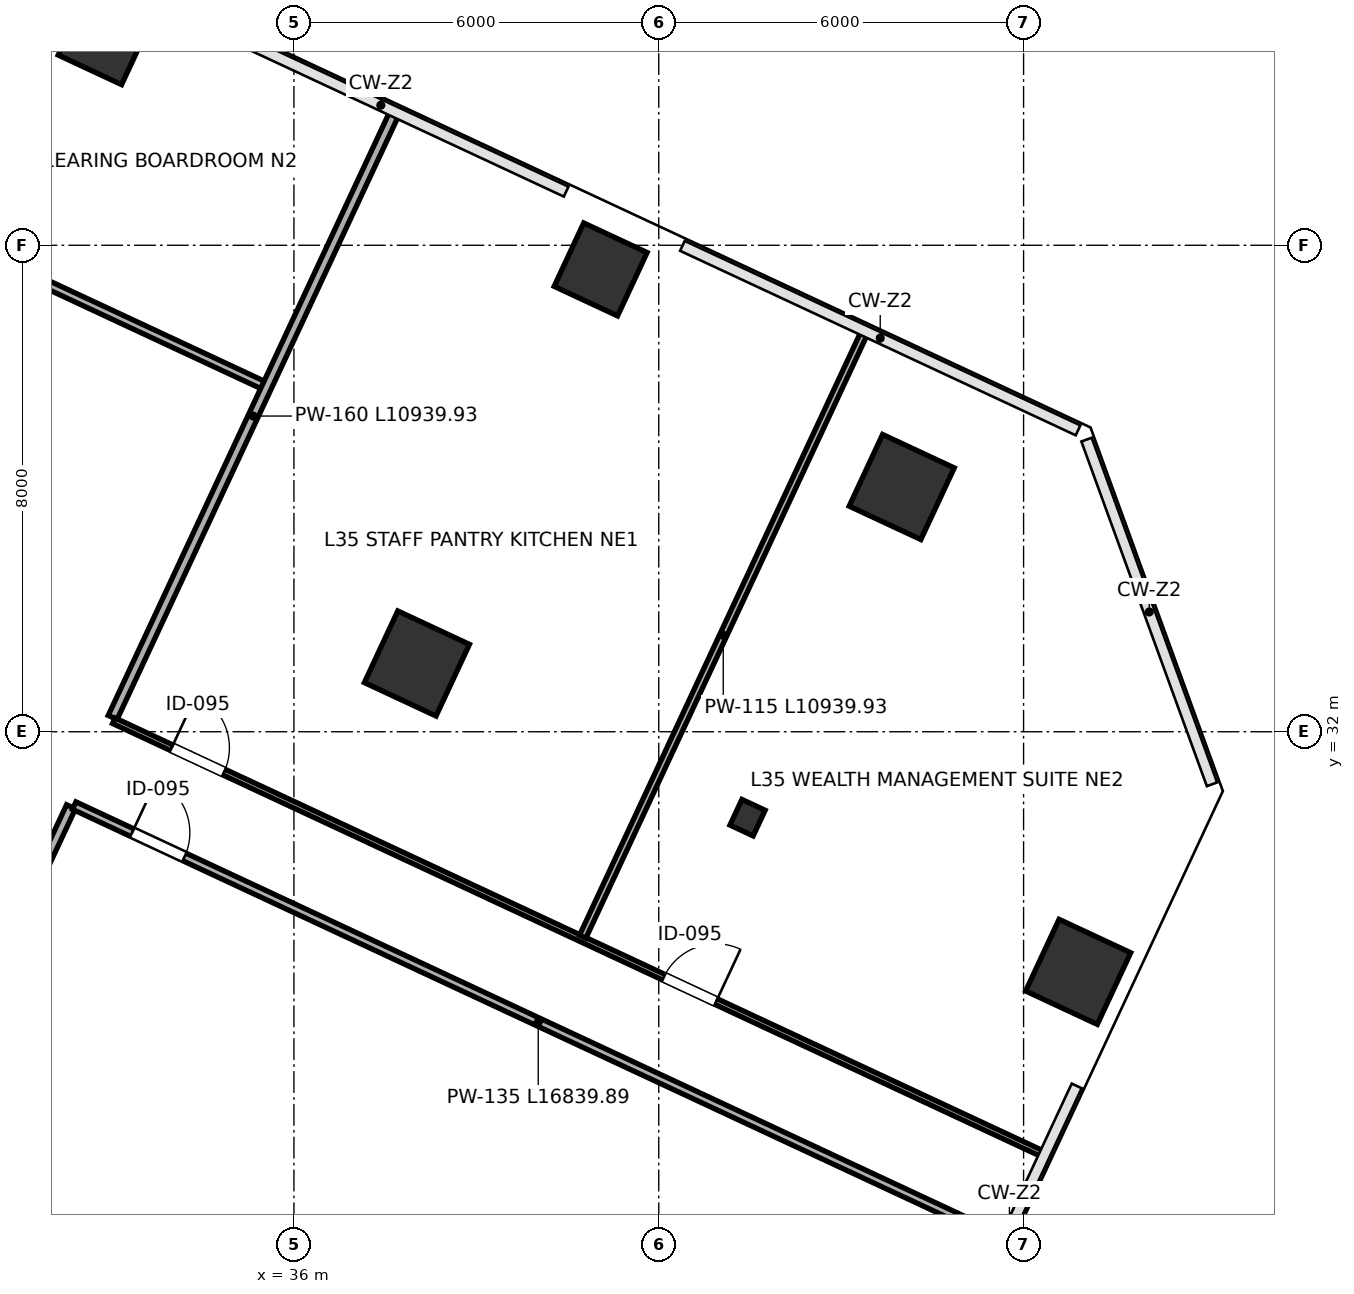
"""IFC4 building model, lengths in metres.
Left out: names, types, materials, properties, quantities, classifications, styles, units other than length and angle.
Written with IfcOpenShell. Run it as: python <this file> out.ifc"""

import sys

from ifc_helpers import new_model, si_unit, direction, frame, frame_2d, origin, origin_2d, place, context, subcontext, project, spatial, rectangle, i_section, extrude, clip, halfspace, source, transform, mapped, element, fill, save


model = new_model("IFC4")
c1 = context("Model", 3, precision=1e-05, world=origin(), true_north=direction((0.0, 1.0)))
c2 = subcontext(c1, "Body", "Model", "MODEL_VIEW")
j1 = project(units=[si_unit("LENGTHUNIT", "METRE"), si_unit("PLANEANGLEUNIT", "RADIAN")], contexts=[c1])
p1 = place(None, origin())
s1 = spatial("IfcSite", under=j1, at=p1, CompositionType="ELEMENT")
p2 = place(p1, origin())
s2 = spatial("IfcBuilding", under=s1, at=p2, CompositionType="ELEMENT")
p3 = place(p2, frame((0.0, 0.0, 158.2)))
s3 = spatial("IfcBuildingStorey", under=s2, at=p3, CompositionType="ELEMENT", Elevation=158.2)
p4 = place(p3, frame((32.887, 43.406, 0.0), z_axis=(0.058390097593, -0.059606557959, 0.996512746909), x_axis=(-0.942137163115, -0.333367736718, 0.035263550505)))
e1 = element("IfcColumn", 1, at=p4, inside=s3, PredefinedType="COLUMN", context=c2, shape_type="Clipping", body=[
    clip(clip(extrude(rectangle(XDim=1.15, YDim=1.15, at=origin_2d()), origin(), (0.0, 0.0, 1.0), 4.215), halfspace(frame((0.0, 0.0, 0.065), z_axis=(0.0, 0.0, -1.0), x_axis=(1.0, 0.0, 0.0)), False)), halfspace(frame((0.0, 0.0, 4.15), z_axis=(0.0, 0.0, 1.0), x_axis=(1.0, 0.0, 0.0)), False)),
])
p5 = place(p3, frame((38.022, 33.123, 0.0), z_axis=(0.004864889576, -0.085598890399, 0.996317802115), x_axis=(-0.928739514699, 0.368958004081, 0.036234031812)))
e2 = element("IfcColumn", 2, at=p5, inside=s3, PredefinedType="COLUMN", context=c2, shape_type="Clipping", body=[
    clip(clip(extrude(rectangle(XDim=1.3, YDim=1.3, at=origin_2d()), origin(), (0.0, 0.0, 1.0), 4.216), halfspace(frame((0.0, 0.0, 0.075), z_axis=(0.0, 0.0, -1.0), x_axis=(1.0, 0.0, 0.0)), False)), halfspace(frame((0.0, 0.0, 4.141), z_axis=(0.0, 0.0, 1.0), x_axis=(1.0, 0.0, 0.0)), False)),
])
p6 = place(p3, frame((41.044, 39.603, 0.0), z_axis=(0.038139756449, -0.101359292139, 0.994118530596), x_axis=(-0.996204703506, 0.074036702097, 0.045768498506)))
e3 = element("IfcColumn", 3, at=p6, inside=s3, PredefinedType="COLUMN", context=c2, shape_type="Clipping", body=[
    clip(clip(extrude(rectangle(XDim=1.15, YDim=1.15, at=origin_2d()), origin(), (0.0, 0.0, 1.0), 4.225), halfspace(frame((0.0, 0.0, 0.084), z_axis=(0.0, 0.0, -1.0), x_axis=(1.0, 0.0, 0.0)), False)), halfspace(frame((0.0, 0.0, 4.141), z_axis=(0.0, 0.0, 1.0), x_axis=(1.0, 0.0, 0.0)), False)),
])
p7 = place(p3, frame((43.46, 30.587, 0.0), z_axis=(-0.008489733, -0.113254193287, 0.993529774157), x_axis=(-0.87238491172, 0.486457395979, 0.04799758016)))
e4 = element("IfcColumn", 4, at=p7, inside=s3, PredefinedType="COLUMN", context=c2, shape_type="Clipping", body=[
    clip(clip(extrude(i_section(OverallWidth=0.421, OverallDepth=0.465, WebThickness=0.045, FlangeThickness=0.072, FilletRadius=0.015, at=origin_2d()), origin(), (0.0, 0.0, 1.0), 4.227), halfspace(frame((0.0, 0.0, 0.035), z_axis=(0.0, 0.0, -1.0), x_axis=(1.0, 0.0, 0.0)), False)), halfspace(frame((0.0, 0.0, 4.192), z_axis=(0.0, 0.0, 1.0), x_axis=(1.0, 0.0, 0.0)), False)),
])
p8 = place(p3, frame((45.996, 36.025, 0.0), z_axis=(0.019313420734, -0.126430840804, 0.991787393685), x_axis=(-0.959209091599, 0.277482108063, 0.054051811235)))
e5 = element("IfcColumn", 5, at=p8, inside=s3, PredefinedType="COLUMN", context=c2, shape_type="Clipping", body=[
    clip(clip(extrude(rectangle(XDim=1.3, YDim=1.3, at=origin_2d()), origin(), (0.0, 0.0, 1.0), 4.235), halfspace(frame((0.0, 0.0, 0.112), z_axis=(0.0, 0.0, -1.0), x_axis=(1.0, 0.0, 0.0)), False)), halfspace(frame((0.0, 0.0, 4.123), z_axis=(0.0, 0.0, 1.0), x_axis=(1.0, 0.0, 0.0)), False)),
])
p9 = place(p3, frame((48.898, 28.051, 0.0), z_axis=(-0.021864344018, -0.140622254685, 0.989821868797), x_axis=(-0.831278676398, 0.552592535403, 0.060143594692)))
e6 = element("IfcColumn", 6, at=p9, inside=s3, PredefinedType="COLUMN", context=c2, shape_type="Clipping", body=[
    clip(clip(extrude(rectangle(XDim=1.3, YDim=1.3, at=origin_2d()), origin(), (0.0, 0.0, 1.0), 4.243), halfspace(frame((0.0, 0.0, 0.125), z_axis=(0.0, 0.0, -1.0), x_axis=(1.0, 0.0, 0.0)), False)), halfspace(frame((0.0, 0.0, 4.118), z_axis=(0.0, 0.0, 1.0), x_axis=(1.0, 0.0, 0.0)), False)),
])
p10 = place(p3, frame((11.673, 48.808, 0.0), z_axis=(0.0, 0.0, 1.0), x_axis=(0.906307085664, -0.422619765836, 0.0)))
e7 = element("IfcWall", 7, at=p10, inside=s3, PredefinedType="PARTITIONING", context=c2, shape_type="SweptSolid", body=[
    extrude(rectangle(XDim=26.31, YDim=0.135, at=frame_2d((13.155, 0.0))), origin(), (0.0, 0.0, 1.0), 3.96),
])
p11 = place(p10, frame((2.1, 0.0, 0.0)))
e8 = element("IfcOpeningElement", 8, at=p11, cuts=e7, PredefinedType="OPENING", context=c2, shape_type="SweptSolid", body=[
    extrude(rectangle(XDim=0.95, YDim=2.15, at=frame_2d((0.475, 1.075))), frame((0.0, 0.078, 0.0), z_axis=(0.0, -1.0, 0.0), x_axis=(1.0, 0.0, 0.0)), (0.0, 0.0, 1.0), 0.155),
])
p12 = place(p10, frame((18.2, 0.0, 0.0)))
e9 = element("IfcOpeningElement", 9, at=p12, cuts=e7, PredefinedType="OPENING", context=c2, shape_type="SweptSolid", body=[
    extrude(rectangle(XDim=0.95, YDim=2.15, at=frame_2d((0.475, 1.075))), frame((0.0, 0.078, 0.0), z_axis=(0.0, -1.0, 0.0), x_axis=(1.0, 0.0, 0.0)), (0.0, 0.0, 1.0), 0.155),
])
p13 = place(p3, frame((33.018, 32.234, 0.0), z_axis=(0.0, 0.0, 1.0), x_axis=(0.422624006235, 0.906305108313, 0.0)))
e10 = element("IfcWall", 10, at=p13, inside=s3, PredefinedType="PARTITIONING", context=c2, shape_type="SweptSolid", body=[
    extrude(rectangle(XDim=10.94, YDim=0.16, at=frame_2d((5.47, 0.0))), origin(), (0.0, 0.0, 1.0), 3.195),
])
p14 = place(p3, frame((23.256, 11.299, 0.0), z_axis=(0.0, 0.0, 1.0), x_axis=(0.422623489462, 0.906305349292, 0.0)))
e11 = element("IfcWall", 11, at=p14, inside=s3, PredefinedType="PARTITIONING", context=c2, shape_type="SweptSolid", body=[
    extrude(rectangle(XDim=21.48, YDim=0.16, at=frame_2d((10.74, 0.0))), origin(), (0.0, 0.0, 1.0), 3.96),
])
p15 = place(p3, frame((33.038, 32.181, 0.0), z_axis=(0.0, 0.0, 1.0), x_axis=(0.906309400931, -0.422614800716, 0.0)))
e12 = element("IfcWall", 12, at=p15, inside=s3, PredefinedType="PARTITIONING", context=c2, shape_type="SweptSolid", body=[
    extrude(rectangle(XDim=16.84, YDim=0.1, at=frame_2d((8.42, 0.0))), origin(), (0.0, 0.0, 1.0), 3.96),
])
p16 = place(p15, frame((1.05, 0.0, 0.0)))
e13 = element("IfcOpeningElement", 13, at=p16, cuts=e12, PredefinedType="OPENING", context=c2, shape_type="SweptSolid", body=[
    extrude(rectangle(XDim=0.95, YDim=2.15, at=frame_2d((0.475, 1.075))), frame((0.0, 0.06, 0.0), z_axis=(0.0, -1.0, 0.0), x_axis=(1.0, 0.0, 0.0)), (0.0, 0.0, 1.0), 0.12),
])
p17 = place(p15, frame((9.98, 0.0, 0.0)))
e14 = element("IfcOpeningElement", 14, at=p17, cuts=e12, PredefinedType="OPENING", context=c2, shape_type="SweptSolid", body=[
    extrude(rectangle(XDim=0.95, YDim=2.15, at=frame_2d((0.475, 1.075))), frame((0.0, 0.06, 0.0), z_axis=(0.0, -1.0, 0.0), x_axis=(1.0, 0.0, 0.0)), (0.0, 0.0, 1.0), 0.12),
])
p18 = place(p3, frame((32.387, 30.785, 0.0), z_axis=(0.0, 0.0, 1.0), x_axis=(0.906303847891, -0.422626709163, 0.0)))
e15 = element("IfcWall", 15, at=p18, inside=s3, PredefinedType="PARTITIONING", context=c2, shape_type="SweptSolid", body=[
    extrude(rectangle(XDim=16.84, YDim=0.135, at=frame_2d((8.42, 0.0))), origin(), (0.0, 0.0, 1.0), 3.96),
])
p19 = place(p18, frame((1.05, 0.0, 0.0)))
e16 = element("IfcOpeningElement", 16, at=p19, cuts=e15, PredefinedType="OPENING", context=c2, shape_type="SweptSolid", body=[
    extrude(rectangle(XDim=0.95, YDim=2.15, at=frame_2d((0.475, 1.075))), frame((0.0, 0.078, 0.0), z_axis=(0.0, -1.0, 0.0), x_axis=(1.0, 0.0, 0.0)), (0.0, 0.0, 1.0), 0.155),
])
p20 = place(p3, frame((40.749, 28.629, 0.0), z_axis=(0.0, 0.0, 1.0), x_axis=(0.422632554077, 0.906301122274, 0.0)))
e17 = element("IfcWall", 17, at=p20, inside=s3, PredefinedType="PARTITIONING", context=c2, shape_type="SweptSolid", body=[
    extrude(rectangle(XDim=10.94, YDim=0.115, at=frame_2d((5.47, 0.0))), origin(), (0.0, 0.0, 1.0), 3.96),
])
m1 = source(origin(), c2, "Body", "SweptSolid", [
    extrude(rectangle(XDim=0.95, YDim=2.15, at=frame_2d((0.475, 1.075))), frame((0.0, 0.025, 0.0), z_axis=(0.0, -1.0, 0.0), x_axis=(1.0, 0.0, 0.0)), (0.0, 0.0, 1.0), 0.05),
])
p21 = place(p16, origin())
e18 = element("IfcDoor", 18, at=p21, inside=s3, OperationType="SINGLE_SWING_LEFT", PredefinedType="DOOR", context=c2, shape_type="MappedRepresentation", body=[
    mapped(m1, transform((0.0, 0.0, 0.0), scale=1.0)),
])
fill(e13, e18)
p22 = place(p17, origin())
e19 = element("IfcDoor", 19, at=p22, inside=s3, OperationType="SINGLE_SWING_RIGHT", PredefinedType="DOOR", context=c2, shape_type="MappedRepresentation", body=[
    mapped(m1, transform((0.0, 0.0, 0.0), scale=1.0)),
])
fill(e14, e19)
p23 = place(p19, origin())
e20 = element("IfcDoor", 20, at=p23, inside=s3, OperationType="SINGLE_SWING_LEFT", PredefinedType="DOOR", context=c2, shape_type="MappedRepresentation", body=[
    mapped(m1, transform((0.0, 0.0, 0.0), scale=1.0)),
])
fill(e16, e20)
save(model, sys.argv[1])
